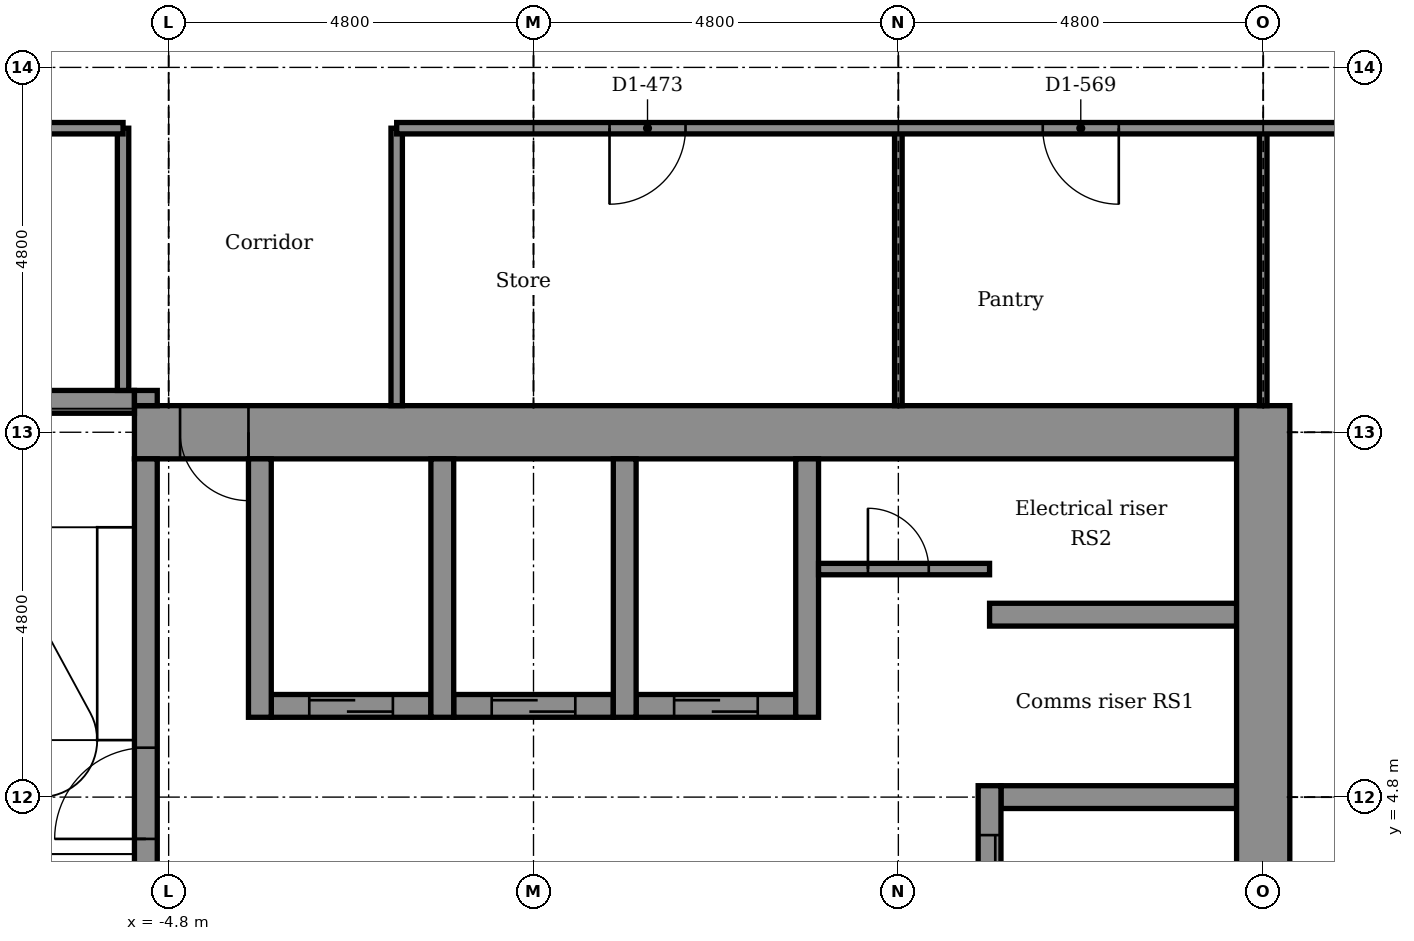
"""IFC4 building model, lengths in metres.
Left out: names, types, materials, properties, quantities, classifications, styles, units other than length and angle.
Written with IfcOpenShell. Run it as: python <this file> out.ifc"""

import sys

from ifc_helpers import new_model, si_unit, direction, frame, frame_2d, origin, place, context, subcontext, project, spatial, rectangle, extrude, element, fill, save


model = new_model("IFC4")
c1 = context("Model", 3, precision=1e-05, world=origin(), true_north=direction((0.0, 1.0)))
c2 = subcontext(c1, "Body", "Model", "MODEL_VIEW")
j1 = project(units=[si_unit("LENGTHUNIT", "METRE"), si_unit("PLANEANGLEUNIT", "RADIAN")], contexts=[c1])
p1 = place(None, origin())
s1 = spatial("IfcSite", under=j1, at=p1, CompositionType="ELEMENT")
p2 = place(p1, origin())
s2 = spatial("IfcBuilding", under=s1, at=p2, CompositionType="ELEMENT")
p3 = place(p2, frame((0.0, 0.0, 201.2)))
s3 = spatial("IfcBuildingStorey", under=s2, at=p3, CompositionType="ELEMENT", Elevation=201.2)
p4 = place(p3, frame((6.15, 4.8, -0.15), z_axis=(0.0, 0.0, 1.0), x_axis=(1.0, 0.0, 0.0)))
e1 = element("IfcWall", 1, at=p4, inside=s3, PredefinedType="STANDARD", context=c2, shape_type="SweptSolid", body=[
    extrude(rectangle(XDim=3.1, YDim=0.3, at=frame_2d((1.55, 0.0))), origin(), (0.0, 0.0, 1.0), 3.9),
])
p5 = place(p3, frame((-3.45, 6.0, -0.15), z_axis=(0.0, 0.0, 1.0), x_axis=(1.0, 0.0, 0.0)))
e2 = element("IfcWall", 2, at=p5, inside=s3, PredefinedType="STANDARD", context=c2, shape_type="SweptSolid", body=[
    extrude(rectangle(XDim=2.1, YDim=0.3, at=frame_2d((1.05, 0.0))), origin(), (0.0, 0.0, 1.0), 3.9),
])
p6 = place(p5, frame((0.5, 0.0, 0.15)))
e3 = element("IfcOpeningElement", 3, at=p6, cuts=e2, PredefinedType="OPENING", context=c2, shape_type="SweptSolid", body=[
    extrude(rectangle(XDim=1.1, YDim=2.1, at=frame_2d((0.55, 1.05))), frame((0.0, 0.16, 0.0), z_axis=(0.0, -1.0, 0.0), x_axis=(1.0, 0.0, 0.0)), (0.0, 0.0, 1.0), 0.32),
])
p7 = place(p3, frame((-1.05, 6.0, -0.15), z_axis=(0.0, 0.0, 1.0), x_axis=(1.0, 0.0, 0.0)))
e4 = element("IfcWall", 4, at=p7, inside=s3, PredefinedType="STANDARD", context=c2, shape_type="SweptSolid", body=[
    extrude(rectangle(XDim=2.1, YDim=0.3, at=frame_2d((1.05, 0.0))), origin(), (0.0, 0.0, 1.0), 3.9),
])
p8 = place(p7, frame((0.5, 0.0, 0.15)))
e5 = element("IfcOpeningElement", 5, at=p8, cuts=e4, PredefinedType="OPENING", context=c2, shape_type="SweptSolid", body=[
    extrude(rectangle(XDim=1.1, YDim=2.1, at=frame_2d((0.55, 1.05))), frame((0.0, 0.16, 0.0), z_axis=(0.0, -1.0, 0.0), x_axis=(1.0, 0.0, 0.0)), (0.0, 0.0, 1.0), 0.32),
])
p9 = place(p3, frame((1.35, 6.0, -0.15), z_axis=(0.0, 0.0, 1.0), x_axis=(1.0, 0.0, 0.0)))
e6 = element("IfcWall", 6, at=p9, inside=s3, PredefinedType="STANDARD", context=c2, shape_type="SweptSolid", body=[
    extrude(rectangle(XDim=2.1, YDim=0.3, at=frame_2d((1.05, 0.0))), origin(), (0.0, 0.0, 1.0), 3.9),
])
p10 = place(p9, frame((0.5, 0.0, 0.15)))
e7 = element("IfcOpeningElement", 7, at=p10, cuts=e6, PredefinedType="OPENING", context=c2, shape_type="SweptSolid", body=[
    extrude(rectangle(XDim=1.1, YDim=2.1, at=frame_2d((0.55, 1.05))), frame((0.0, 0.16, 0.0), z_axis=(0.0, -1.0, 0.0), x_axis=(1.0, 0.0, 0.0)), (0.0, 0.0, 1.0), 0.32),
])
p11 = place(p3, frame((6.0, 7.2, -0.15), z_axis=(0.0, 0.0, 1.0), x_axis=(1.0, 0.0, 0.0)))
e8 = element("IfcWall", 8, at=p11, inside=s3, PredefinedType="STANDARD", context=c2, shape_type="SweptSolid", body=[
    extrude(rectangle(XDim=3.25, YDim=0.3, at=frame_2d((1.625, 0.0))), origin(), (0.0, 0.0, 1.0), 3.9),
])
p12 = place(p3, frame((-5.25, 9.6, -0.15), z_axis=(0.0, 0.0, 1.0), x_axis=(1.0, 0.0, 0.0)))
e9 = element("IfcWall", 9, at=p12, inside=s3, PredefinedType="SHEAR", context=c2, shape_type="SweptSolid", body=[
    extrude(rectangle(XDim=14.5, YDim=0.7, at=frame_2d((7.25, 0.0))), origin(), (0.0, 0.0, 1.0), 3.9),
])
p13 = place(p12, frame((0.6, 0.0, 0.15)))
e10 = element("IfcOpeningElement", 10, at=p13, cuts=e9, PredefinedType="OPENING", context=c2, shape_type="SweptSolid", body=[
    extrude(rectangle(XDim=0.9, YDim=2.1, at=frame_2d((0.45, 1.05))), frame((0.0, 0.36, 0.0), z_axis=(0.0, -1.0, 0.0), x_axis=(1.0, 0.0, 0.0)), (0.0, 0.0, 1.0), 0.72),
])
p14 = place(p3, frame((-9.25, 10.0, -0.15), z_axis=(0.0, 0.0, 1.0), x_axis=(1.0, 0.0, 0.0)))
e11 = element("IfcWall", 11, at=p14, inside=s3, PredefinedType="STANDARD", context=c2, shape_type="SweptSolid", body=[
    extrude(rectangle(XDim=4.0, YDim=0.3, at=frame_2d((2.0, 0.0))), origin(), (0.0, 0.0, 1.0), 3.9),
])
p15 = place(p3, frame((-5.1, 2.25, -0.15), z_axis=(0.0, 0.0, 1.0), x_axis=(0.0, 1.0, 0.0)))
e12 = element("IfcWall", 12, at=p15, inside=s3, PredefinedType="STANDARD", context=c2, shape_type="SweptSolid", body=[
    extrude(rectangle(XDim=7.0, YDim=0.3, at=frame_2d((3.5, 0.0))), origin(), (0.0, 0.0, 1.0), 3.9),
])
p16 = place(p15, frame((2.0, 0.0, 0.15)))
e13 = element("IfcOpeningElement", 13, at=p16, cuts=e12, PredefinedType="OPENING", context=c2, shape_type="SweptSolid", body=[
    extrude(rectangle(XDim=1.2, YDim=2.1, at=frame_2d((0.6, 1.05))), frame((0.0, 0.16, 0.0), z_axis=(0.0, -1.0, 0.0), x_axis=(1.0, 0.0, 0.0)), (0.0, 0.0, 1.0), 0.32),
])
p17 = place(p3, frame((-5.1, 9.95, -0.15), z_axis=(0.0, 0.0, 1.0), x_axis=(0.0, 1.0, 0.0)))
e14 = element("IfcWall", 14, at=p17, inside=s3, PredefinedType="STANDARD", context=c2, shape_type="SweptSolid", body=[
    extrude(rectangle(XDim=0.2, YDim=0.3, at=frame_2d((0.1, 0.0))), origin(), (0.0, 0.0, 1.0), 3.9),
])
for number, where, z_axis, x_axis in (
    (15, (-3.6, 5.85, -0.15), (0.0, 0.0, 1.0), (0.0, 1.0, 0.0)),
    (16, (-1.2, 5.85, -0.15), (0.0, 0.0, 1.0), (0.0, 1.0, 0.0)),
    (17, (1.2, 5.85, -0.15), (0.0, 0.0, 1.0), (0.0, 1.0, 0.0)),
    (18, (3.6, 5.85, -0.15), (0.0, 0.0, 1.0), (0.0, 1.0, 0.0)),
):
    element("IfcWall", number, at=place(p3, frame(where, z_axis=z_axis, x_axis=x_axis)), inside=s3, PredefinedType="STANDARD", context=c2, shape_type="SweptSolid", body=[
        extrude(rectangle(XDim=3.4, YDim=0.3, at=frame_2d((1.7, 0.0))), origin(), (0.0, 0.0, 1.0), 3.9),
    ])
p18 = place(p3, frame((6.0, -2.55, -0.15), z_axis=(0.0, 0.0, 1.0), x_axis=(0.0, 1.0, 0.0)))
e19 = element("IfcWall", 19, at=p18, inside=s3, PredefinedType="STANDARD", context=c2, shape_type="SweptSolid", body=[
    extrude(rectangle(XDim=7.5, YDim=0.3, at=frame_2d((3.75, 0.0))), origin(), (0.0, 0.0, 1.0), 3.9),
])
p19 = place(p18, frame((0.65, 0.0, 0.15)))
e20 = element("IfcOpeningElement", 20, at=p19, cuts=e19, PredefinedType="OPENING", context=c2, shape_type="SweptSolid", body=[
    extrude(rectangle(XDim=1.4, YDim=2.1, at=frame_2d((0.7, 1.05))), frame((0.0, 0.16, 0.0), z_axis=(0.0, -1.0, 0.0), x_axis=(1.0, 0.0, 0.0)), (0.0, 0.0, 1.0), 0.32),
])
p20 = place(p18, frame((3.05, 0.0, 0.15)))
e21 = element("IfcOpeningElement", 21, at=p20, cuts=e19, PredefinedType="OPENING", context=c2, shape_type="SweptSolid", body=[
    extrude(rectangle(XDim=1.4, YDim=2.1, at=frame_2d((0.7, 1.05))), frame((0.0, 0.16, 0.0), z_axis=(0.0, -1.0, 0.0), x_axis=(1.0, 0.0, 0.0)), (0.0, 0.0, 1.0), 0.32),
])
p21 = place(p18, frame((5.45, 0.0, 0.15)))
e22 = element("IfcOpeningElement", 22, at=p21, cuts=e19, PredefinedType="OPENING", context=c2, shape_type="SweptSolid", body=[
    extrude(rectangle(XDim=1.4, YDim=2.1, at=frame_2d((0.7, 1.05))), frame((0.0, 0.16, 0.0), z_axis=(0.0, -1.0, 0.0), x_axis=(1.0, 0.0, 0.0)), (0.0, 0.0, 1.0), 0.32),
])
p22 = place(p3, frame((9.6, -10.15, -0.15), z_axis=(0.0, 0.0, 1.0), x_axis=(0.0, 1.0, 0.0)))
e23 = element("IfcWall", 23, at=p22, inside=s3, PredefinedType="SHEAR", context=c2, shape_type="SweptSolid", body=[
    extrude(rectangle(XDim=20.1, YDim=0.7, at=frame_2d((10.05, 0.0))), origin(), (0.0, 0.0, 1.0), 3.9),
])
for number, where, z_axis, x_axis in (
    (24, (9.6, 9.95, 0.0), (0.0, 0.0, 1.0), (0.0, 1.0, 0.0)),
    (25, (4.8, 9.95, 0.0), (0.0, 0.0, 1.0), (0.0, 1.0, 0.0)),
):
    element("IfcWall", number, at=place(p3, frame(where, z_axis=z_axis, x_axis=x_axis)), inside=s3, PredefinedType="PARTITIONING", context=c2, shape_type="SweptSolid", body=[
        extrude(rectangle(XDim=3.65, YDim=0.1, at=frame_2d((1.825, 0.0))), origin(), (0.0, 0.0, 1.0), 3.066),
    ])
p23 = place(p3, frame((-1.8, 9.95, 0.0), z_axis=(0.0, 0.0, 1.0), x_axis=(0.0, 1.0, 0.0)))
e26 = element("IfcWall", 26, at=p23, inside=s3, PredefinedType="PARTITIONING", context=c2, shape_type="SweptSolid", body=[
    extrude(rectangle(XDim=3.65, YDim=0.15, at=frame_2d((1.825, 0.0))), origin(), (0.0, 0.0, 1.0), 3.75),
])
p24 = place(p3, frame((-5.4, 10.15, 0.0), z_axis=(0.0, 0.0, 1.0), x_axis=(0.0, 1.0, 0.0)))
e27 = element("IfcWall", 27, at=p24, inside=s3, PredefinedType="PARTITIONING", context=c2, shape_type="SweptSolid", body=[
    extrude(rectangle(XDim=3.45, YDim=0.15, at=frame_2d((1.725, 0.0))), origin(), (0.0, 0.0, 1.0), 3.75),
])
p25 = place(p3, frame((3.75, 7.8, 0.0), z_axis=(0.0, 0.0, 1.0), x_axis=(1.0, 0.0, 0.0)))
e28 = element("IfcWall", 28, at=p25, inside=s3, PredefinedType="PARTITIONING", context=c2, shape_type="SweptSolid", body=[
    extrude(rectangle(XDim=2.25, YDim=0.15, at=frame_2d((1.125, 0.0))), origin(), (0.0, 0.0, 1.0), 3.75),
])
p26 = place(p25, frame((0.65, 0.0, 0.0)))
e29 = element("IfcOpeningElement", 29, at=p26, cuts=e28, PredefinedType="OPENING", context=c2, shape_type="SweptSolid", body=[
    extrude(rectangle(XDim=0.8, YDim=2.1, at=frame_2d((0.4, 1.05))), frame((0.0, 0.085, 0.0), z_axis=(0.0, -1.0, 0.0), x_axis=(1.0, 0.0, 0.0)), (0.0, 0.0, 1.0), 0.17),
])
p27 = place(p3, frame((-19.077, 13.6, 0.0), z_axis=(0.0, 0.0, 1.0), x_axis=(1.0, 0.0, 0.0)))
e30 = element("IfcWall", 30, at=p27, inside=s3, PredefinedType="PARTITIONING", context=c2, shape_type="SweptSolid", body=[
    extrude(rectangle(XDim=13.677, YDim=0.15, at=frame_2d((6.839, 0.0))), origin(), (0.0, 0.0, 1.0), 3.75),
])
p28 = place(p27, frame((9.083, 0.0, 0.0)))
e31 = element("IfcOpeningElement", 31, at=p28, cuts=e30, PredefinedType="OPENING", context=c2, shape_type="SweptSolid", body=[
    extrude(rectangle(XDim=1.0, YDim=2.1, at=frame_2d((0.5, 1.05))), frame((0.0, 0.085, 0.0), z_axis=(0.0, -1.0, 0.0), x_axis=(1.0, 0.0, 0.0)), (0.0, 0.0, 1.0), 0.17),
])
p29 = place(p27, frame((6.402, 0.0, 0.0)))
e32 = element("IfcOpeningElement", 32, at=p29, cuts=e30, PredefinedType="OPENING", context=c2, shape_type="SweptSolid", body=[
    extrude(rectangle(XDim=1.0, YDim=2.1, at=frame_2d((0.5, 1.05))), frame((0.0, 0.085, 0.0), z_axis=(0.0, -1.0, 0.0), x_axis=(1.0, 0.0, 0.0)), (0.0, 0.0, 1.0), 0.17),
])
p30 = place(p3, frame((-1.8, 13.6, 0.0), z_axis=(0.0, 0.0, 1.0), x_axis=(1.0, 0.0, 0.0)))
e33 = element("IfcWall", 33, at=p30, inside=s3, PredefinedType="PARTITIONING", context=c2, shape_type="SweptSolid", body=[
    extrude(rectangle(XDim=19.076, YDim=0.15, at=frame_2d((9.538, 0.0))), origin(), (0.0, 0.0, 1.0), 3.75),
])
p31 = place(p30, frame((2.8, 0.0, 0.0)))
e34 = element("IfcOpeningElement", 34, at=p31, cuts=e33, PredefinedType="OPENING", context=c2, shape_type="SweptSolid", body=[
    extrude(rectangle(XDim=1.0, YDim=2.1, at=frame_2d((0.5, 1.05))), frame((0.0, 0.085, 0.0), z_axis=(0.0, -1.0, 0.0), x_axis=(1.0, 0.0, 0.0)), (0.0, 0.0, 1.0), 0.17),
])
p32 = place(p30, frame((8.5, 0.0, 0.0)))
e35 = element("IfcOpeningElement", 35, at=p32, cuts=e33, PredefinedType="OPENING", context=c2, shape_type="SweptSolid", body=[
    extrude(rectangle(XDim=1.0, YDim=2.1, at=frame_2d((0.5, 1.05))), frame((0.0, 0.085, 0.0), z_axis=(0.0, -1.0, 0.0), x_axis=(1.0, 0.0, 0.0)), (0.0, 0.0, 1.0), 0.17),
])
p33 = place(p26, origin())
e36 = element("IfcDoor", 36, at=p33, inside=s3, OperationType="SINGLE_SWING_LEFT", PredefinedType="DOOR", context=c2, shape_type="SweptSolid", body=[
    extrude(rectangle(XDim=0.8, YDim=2.1, at=frame_2d((0.4, 1.05))), frame((0.0, 0.025, 0.0), z_axis=(0.0, -1.0, 0.0), x_axis=(1.0, 0.0, 0.0)), (0.0, 0.0, 1.0), 0.05),
])
fill(e29, e36)
p34 = place(p31, frame((1.0, 0.0, 0.0), z_axis=(0.0, 0.0, 1.0), x_axis=(-1.0, 0.0, 0.0)))
e37 = element("IfcDoor", 37, at=p34, inside=s3, OperationType="SINGLE_SWING_LEFT", PredefinedType="DOOR", context=c2, shape_type="SweptSolid", body=[
    extrude(rectangle(XDim=1.0, YDim=2.1, at=frame_2d((0.5, 1.05))), frame((0.0, 0.025, 0.0), z_axis=(0.0, -1.0, 0.0), x_axis=(1.0, 0.0, 0.0)), (0.0, 0.0, 1.0), 0.05),
])
fill(e34, e37)
p35 = place(p32, frame((1.0, 0.0, 0.0), z_axis=(0.0, 0.0, 1.0), x_axis=(-1.0, 0.0, 0.0)))
e38 = element("IfcDoor", 38, at=p35, inside=s3, OperationType="SINGLE_SWING_RIGHT", PredefinedType="DOOR", context=c2, shape_type="SweptSolid", body=[
    extrude(rectangle(XDim=1.0, YDim=2.1, at=frame_2d((0.5, 1.05))), frame((0.0, 0.025, 0.0), z_axis=(0.0, -1.0, 0.0), x_axis=(1.0, 0.0, 0.0)), (0.0, 0.0, 1.0), 0.05),
])
fill(e35, e38)
p36 = place(p21, origin())
e39 = element("IfcDoor", 39, at=p36, inside=s3, OperationType="DOUBLE_DOOR_SLIDING", PredefinedType="DOOR", context=c2, shape_type="SweptSolid", body=[
    extrude(rectangle(XDim=1.4, YDim=2.1, at=frame_2d((0.7, 1.05))), frame((0.0, 0.025, 0.0), z_axis=(0.0, -1.0, 0.0), x_axis=(1.0, 0.0, 0.0)), (0.0, 0.0, 1.0), 0.05),
])
fill(e22, e39)
p37 = place(p6, origin())
e40 = element("IfcDoor", 40, at=p37, inside=s3, OperationType="DOUBLE_DOOR_SLIDING", PredefinedType="DOOR", context=c2, shape_type="SweptSolid", body=[
    extrude(rectangle(XDim=1.1, YDim=2.1, at=frame_2d((0.55, 1.05))), frame((0.0, 0.025, 0.0), z_axis=(0.0, -1.0, 0.0), x_axis=(1.0, 0.0, 0.0)), (0.0, 0.0, 1.0), 0.05),
])
fill(e3, e40)
p38 = place(p8, origin())
e41 = element("IfcDoor", 41, at=p38, inside=s3, OperationType="DOUBLE_DOOR_SLIDING", PredefinedType="DOOR", context=c2, shape_type="SweptSolid", body=[
    extrude(rectangle(XDim=1.1, YDim=2.1, at=frame_2d((0.55, 1.05))), frame((0.0, 0.025, 0.0), z_axis=(0.0, -1.0, 0.0), x_axis=(1.0, 0.0, 0.0)), (0.0, 0.0, 1.0), 0.05),
])
fill(e5, e41)
p39 = place(p10, origin())
e42 = element("IfcDoor", 42, at=p39, inside=s3, OperationType="DOUBLE_DOOR_SLIDING", PredefinedType="DOOR", context=c2, shape_type="SweptSolid", body=[
    extrude(rectangle(XDim=1.1, YDim=2.1, at=frame_2d((0.55, 1.05))), frame((0.0, 0.025, 0.0), z_axis=(0.0, -1.0, 0.0), x_axis=(1.0, 0.0, 0.0)), (0.0, 0.0, 1.0), 0.05),
])
fill(e7, e42)
p40 = place(p16, origin())
e43 = element("IfcDoor", 43, at=p40, inside=s3, OperationType="SINGLE_SWING_LEFT", PredefinedType="DOOR", context=c2, shape_type="SweptSolid", body=[
    extrude(rectangle(XDim=1.2, YDim=2.1, at=frame_2d((0.6, 1.05))), frame((0.0, 0.025, 0.0), z_axis=(0.0, -1.0, 0.0), x_axis=(1.0, 0.0, 0.0)), (0.0, 0.0, 1.0), 0.05),
])
fill(e13, e43)
p41 = place(p13, frame((0.9, 0.0, 0.0), z_axis=(0.0, 0.0, 1.0), x_axis=(-1.0, 0.0, 0.0)))
e44 = element("IfcDoor", 44, at=p41, inside=s3, OperationType="SINGLE_SWING_RIGHT", PredefinedType="DOOR", context=c2, shape_type="SweptSolid", body=[
    extrude(rectangle(XDim=0.9, YDim=2.1, at=frame_2d((0.45, 1.05))), frame((0.0, 0.025, 0.0), z_axis=(0.0, -1.0, 0.0), x_axis=(1.0, 0.0, 0.0)), (0.0, 0.0, 1.0), 0.05),
])
fill(e10, e44)
save(model, sys.argv[1])
